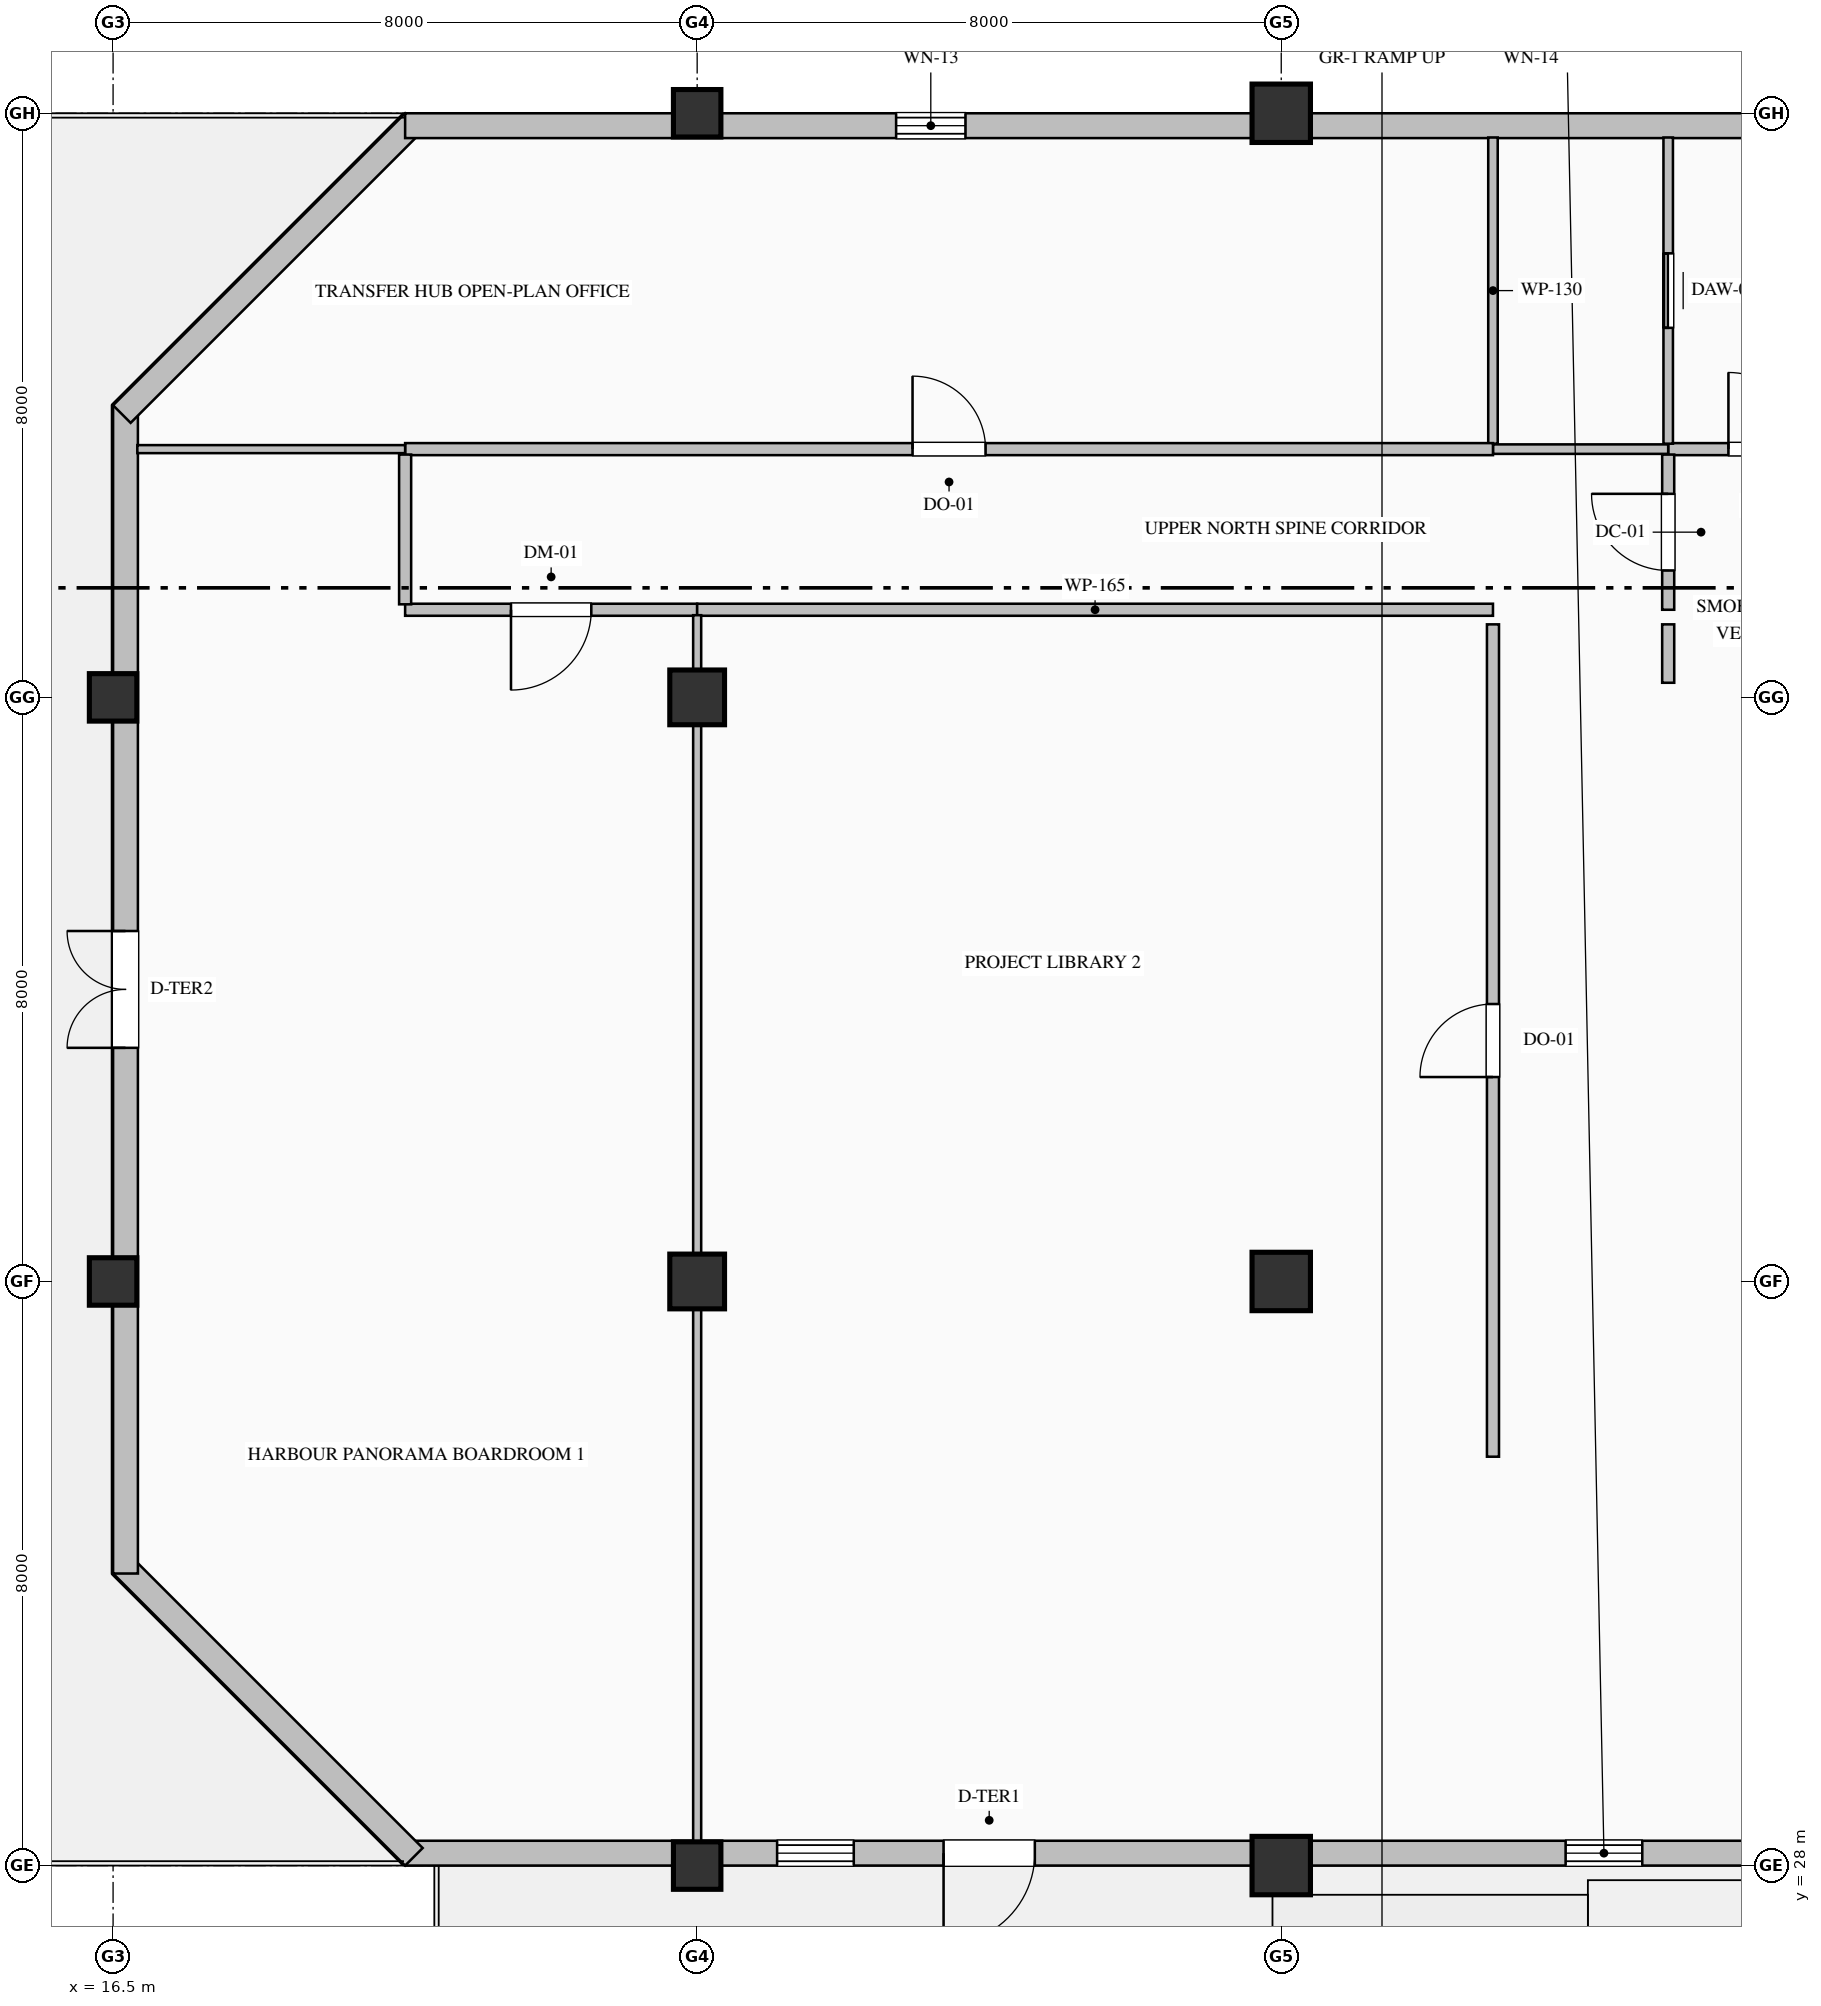
"""IFC4 building model, lengths in metres.
Left out: names, types, materials, properties, quantities, classifications, styles, units other than length and angle.
Written with IfcOpenShell. Run it as: python <this file> out.ifc"""

import sys

from ifc_helpers import new_model, si_unit, direction, frame, frame_2d, origin, origin_2d, place, context, subcontext, project, spatial, rectangle, hollow_rectangle, extrude, element, fill, save


model = new_model("IFC4")
c1 = context("Model", 3, precision=1e-05, world=origin(), true_north=direction((0.0, 1.0)))
c2 = subcontext(c1, "Body", "Model", "MODEL_VIEW")
j1 = project(units=[si_unit("LENGTHUNIT", "METRE"), si_unit("PLANEANGLEUNIT", "RADIAN")], contexts=[c1])
p1 = place(None, origin())
s1 = spatial("IfcSite", under=j1, at=p1, CompositionType="ELEMENT")
p2 = place(p1, origin())
s2 = spatial("IfcBuilding", under=s1, at=p2, CompositionType="ELEMENT")
p3 = place(p2, frame((0.0, 0.0, 287.2)))
s3 = spatial("IfcBuildingStorey", under=s2, at=p3, CompositionType="ELEMENT", Elevation=287.2)
for number, where, z_axis, x_axis in (
    (1, (16.5, 36.0, 0.0), (0.0, 0.0, 1.0), (1.0, 0.0, 0.0)),
    (2, (16.5, 44.0, 0.0), (0.0, 0.0, 1.0), (1.0, 0.0, 0.0)),
    (3, (24.5, 28.0, 0.0), (0.0, 0.0, 1.0), (1.0, 0.0, 0.0)),
):
    element("IfcColumn", number, at=place(p3, frame(where, z_axis=z_axis, x_axis=x_axis)), inside=s3, PredefinedType="COLUMN", context=c2, shape_type="SweptSolid", body=[
        extrude(hollow_rectangle(XDim=0.65, YDim=0.65, WallThickness=0.028, at=origin_2d()), origin(), (0.0, 0.0, 1.0), 4.0),
    ])
for number, where, z_axis, x_axis in (
    (4, (24.5, 36.0, 0.0), (0.0, 0.0, 1.0), (1.0, 0.0, 0.0)),
    (5, (24.5, 44.0, 0.0), (0.0, 0.0, 1.0), (1.0, 0.0, 0.0)),
):
    element("IfcColumn", number, at=place(p3, frame(where, z_axis=z_axis, x_axis=x_axis)), inside=s3, PredefinedType="COLUMN", context=c2, shape_type="SweptSolid", body=[
        extrude(rectangle(XDim=0.75, YDim=0.75, at=origin_2d()), origin(), (0.0, 0.0, 1.0), 4.0),
    ])
p4 = place(p3, frame((24.5, 52.0, 0.0), z_axis=(0.0, 0.0, 1.0), x_axis=(1.0, 0.0, 0.0)))
e6 = element("IfcColumn", 6, at=p4, inside=s3, PredefinedType="COLUMN", context=c2, shape_type="SweptSolid", body=[
    extrude(hollow_rectangle(XDim=0.65, YDim=0.65, WallThickness=0.028, at=origin_2d()), origin(), (0.0, 0.0, 1.0), 4.0),
])
for number, where, z_axis, x_axis in (
    (7, (32.5, 28.0, 0.0), (0.0, 0.0, 1.0), (1.0, 0.0, 0.0)),
    (8, (32.5, 36.0, 0.0), (0.0, 0.0, 1.0), (1.0, 0.0, 0.0)),
    (9, (32.5, 52.0, 0.0), (0.0, 0.0, 1.0), (1.0, 0.0, 0.0)),
):
    element("IfcColumn", number, at=place(p3, frame(where, z_axis=z_axis, x_axis=x_axis)), inside=s3, PredefinedType="COLUMN", context=c2, shape_type="SweptSolid", body=[
        extrude(hollow_rectangle(XDim=0.8, YDim=0.8, WallThickness=0.032, at=origin_2d()), origin(), (0.0, 0.0, 1.0), 4.0),
    ])
p5 = place(p3, frame((40.52, 28.17, 0.0), z_axis=(0.0, 0.0, 1.0), x_axis=(-1.0, 0.0, 0.0)))
e10 = element("IfcWall", 10, at=p5, inside=s3, PredefinedType="SOLIDWALL", context=c2, shape_type="SweptSolid", body=[
    extrude(rectangle(XDim=20.02, YDim=0.34, at=frame_2d((10.01, 0.0))), origin(), (0.0, 0.0, 1.0), 3.185),
])
p6 = place(p5, frame((3.075, 0.0, 0.8)))
e11 = element("IfcOpeningElement", 11, at=p6, cuts=e10, PredefinedType="OPENING", context=c2, shape_type="SweptSolid", body=[
    extrude(rectangle(XDim=1.05, YDim=2.15, at=frame_2d((0.525, 1.075))), frame((0.0, 0.18, 0.0), z_axis=(0.0, -1.0, 0.0), x_axis=(1.0, 0.0, 0.0)), (0.0, 0.0, 1.0), 0.36),
])
p7 = place(p5, frame((13.875, 0.0, 0.8)))
e12 = element("IfcOpeningElement", 12, at=p7, cuts=e10, PredefinedType="OPENING", context=c2, shape_type="SweptSolid", body=[
    extrude(rectangle(XDim=1.05, YDim=2.15, at=frame_2d((0.525, 1.075))), frame((0.0, 0.18, 0.0), z_axis=(0.0, -1.0, 0.0), x_axis=(1.0, 0.0, 0.0)), (0.0, 0.0, 1.0), 0.36),
])
p8 = place(p5, frame((11.395, 0.0, 0.0)))
e13 = element("IfcOpeningElement", 13, at=p8, cuts=e10, PredefinedType="OPENING", context=c2, shape_type="SweptSolid", body=[
    extrude(rectangle(XDim=1.25, YDim=2.25, at=frame_2d((0.625, 1.125))), frame((0.0, 0.18, 0.0), z_axis=(0.0, -1.0, 0.0), x_axis=(1.0, 0.0, 0.0)), (0.0, 0.0, 1.0), 0.36),
])
p9 = place(p3, frame((20.62, 28.12, 0.0), z_axis=(0.0, 0.0, 1.0), x_axis=(-0.707106781187, 0.707106781187, 0.0)))
e14 = element("IfcWall", 14, at=p9, inside=s3, PredefinedType="SOLIDWALL", context=c2, shape_type="SweptSolid", body=[
    extrude(rectangle(XDim=5.657, YDim=0.34, at=frame_2d((2.828, 0.0))), origin(), (0.0, 0.0, 1.0), 3.785),
])
p10 = place(p3, frame((16.67, 32.0, 0.0), z_axis=(0.0, 0.0, 1.0), x_axis=(0.0, 1.0, 0.0)))
e15 = element("IfcWall", 15, at=p10, inside=s3, PredefinedType="SOLIDWALL", context=c2, shape_type="SweptSolid", body=[
    extrude(rectangle(XDim=16.0, YDim=0.34, at=frame_2d((8.0, 0.0))), origin(), (0.0, 0.0, 1.0), 3.335),
])
p11 = place(p10, frame((7.2, 0.0, 0.0)))
e16 = element("IfcOpeningElement", 16, at=p11, cuts=e15, PredefinedType="OPENING", context=c2, shape_type="SweptSolid", body=[
    extrude(rectangle(XDim=1.6, YDim=2.35, at=frame_2d((0.8, 1.175))), frame((0.0, 0.18, 0.0), z_axis=(0.0, -1.0, 0.0), x_axis=(1.0, 0.0, 0.0)), (0.0, 0.0, 1.0), 0.36),
])
p12 = place(p3, frame((16.62, 47.88, 0.0), z_axis=(0.0, 0.0, 1.0), x_axis=(0.707106781187, 0.707106781187, 0.0)))
e17 = element("IfcWall", 17, at=p12, inside=s3, PredefinedType="SOLIDWALL", context=c2, shape_type="SweptSolid", body=[
    extrude(rectangle(XDim=5.657, YDim=0.34, at=frame_2d((2.828, 0.0))), origin(), (0.0, 0.0, 1.0), 3.785),
])
p13 = place(p3, frame((20.5, 51.83, 0.0), z_axis=(0.0, 0.0, 1.0), x_axis=(1.0, 0.0, 0.0)))
e18 = element("IfcWall", 18, at=p13, inside=s3, PredefinedType="SOLIDWALL", context=c2, shape_type="SweptSolid", body=[
    extrude(rectangle(XDim=20.02, YDim=0.34, at=frame_2d((10.01, 0.0))), origin(), (0.0, 0.0, 1.0), 3.335),
])
p14 = place(p13, frame((6.725, 0.0, 0.9)))
e19 = element("IfcOpeningElement", 19, at=p14, cuts=e18, PredefinedType="OPENING", context=c2, shape_type="SweptSolid", body=[
    extrude(rectangle(XDim=0.95, YDim=1.85, at=frame_2d((0.475, 0.925))), frame((0.0, 0.18, 0.0), z_axis=(0.0, -1.0, 0.0), x_axis=(1.0, 0.0, 0.0)), (0.0, 0.0, 1.0), 0.36),
])
p15 = place(p3, frame((37.8, 47.4, 0.0), z_axis=(0.0, 0.0, 1.0), x_axis=(1.0, 0.0, 0.0)))
e20 = element("IfcWall", 20, at=p15, inside=s3, PredefinedType="PARTITIONING", context=c2, shape_type="SweptSolid", body=[
    extrude(rectangle(XDim=2.7, YDim=0.165, at=frame_2d((1.35, 0.0))), origin(), (0.0, 0.0, 1.0), 3.785),
])
p16 = place(p15, frame((0.825, 0.0, 0.0)))
e21 = element("IfcOpeningElement", 21, at=p16, cuts=e20, PredefinedType="OPENING", context=c2, shape_type="SweptSolid", body=[
    extrude(rectangle(XDim=1.05, YDim=2.15, at=frame_2d((0.525, 1.075))), frame((0.0, 0.093, 0.0), z_axis=(0.0, -1.0, 0.0), x_axis=(1.0, 0.0, 0.0)), (0.0, 0.0, 1.0), 0.185),
])
p17 = place(p3, frame((37.8, 45.2, 0.0), z_axis=(0.0, 0.0, 1.0), x_axis=(0.0, 1.0, 0.0)))
e22 = element("IfcWall", 22, at=p17, inside=s3, PredefinedType="PARTITIONING", context=c2, shape_type="SweptSolid", body=[
    extrude(rectangle(XDim=2.125, YDim=0.165, at=frame_2d((1.063, 0.0))), origin(), (0.0, 0.0, 1.0), 3.785),
])
p18 = place(p17, frame((0.538, 0.0, 0.0)))
e23 = element("IfcOpeningElement", 23, at=p18, cuts=e22, PredefinedType="OPENING", context=c2, shape_type="SweptSolid", body=[
    extrude(rectangle(XDim=1.05, YDim=2.15, at=frame_2d((0.525, 1.075))), frame((0.0, 0.093, 0.0), z_axis=(0.0, -1.0, 0.0), x_axis=(1.0, 0.0, 0.0)), (0.0, 0.0, 1.0), 0.185),
])
p19 = place(p3, frame((37.8, 44.2, 0.0), z_axis=(0.0, 0.0, 1.0), x_axis=(0.0, 1.0, 0.0)))
e24 = element("IfcWall", 24, at=p19, inside=s3, PredefinedType="PARTITIONING", context=c2, shape_type="SweptSolid", body=[
    extrude(rectangle(XDim=0.8, YDim=0.165, at=frame_2d((0.4, 0.0))), origin(), (0.0, 0.0, 1.0), 3.785),
])
p20 = place(p3, frame((37.8, 47.475, 0.0), z_axis=(0.0, 0.0, 1.0), x_axis=(0.0, 1.0, 0.0)))
e25 = element("IfcWall", 25, at=p20, inside=s3, PredefinedType="PARTITIONING", context=c2, shape_type="SweptSolid", body=[
    extrude(rectangle(XDim=4.193, YDim=0.13, at=frame_2d((2.097, 0.0))), origin(), (0.0, 0.0, 1.0), 3.785),
])
p21 = place(p20, frame((1.587, 0.0, 0.0)))
e26 = element("IfcOpeningElement", 26, at=p21, cuts=e25, PredefinedType="OPENING", context=c2, shape_type="SweptSolid", body=[
    extrude(rectangle(XDim=1.02, YDim=2.15, at=frame_2d((0.51, 1.075))), frame((0.0, 0.075, 0.0), z_axis=(0.0, -1.0, 0.0), x_axis=(1.0, 0.0, 0.0)), (0.0, 0.0, 1.0), 0.15),
])
p22 = place(p3, frame((37.8, 47.4, 0.0), z_axis=(0.0, 0.0, 1.0), x_axis=(-1.0, 0.0, 0.0)))
e27 = element("IfcWall", 27, at=p22, inside=s3, PredefinedType="PARTITIONING", context=c2, shape_type="SweptSolid", body=[
    extrude(rectangle(XDim=2.4, YDim=0.13, at=frame_2d((1.2, 0.0))), origin(), (0.0, 0.0, 1.0), 3.785),
])
p23 = place(p3, frame((35.4, 47.475, 0.0), z_axis=(0.0, 0.0, 1.0), x_axis=(0.0, 1.0, 0.0)))
e28 = element("IfcWall", 28, at=p23, inside=s3, PredefinedType="PARTITIONING", context=c2, shape_type="SweptSolid", body=[
    extrude(rectangle(XDim=4.193, YDim=0.13, at=frame_2d((2.097, 0.0))), origin(), (0.0, 0.0, 1.0), 3.785),
])
p24 = place(p3, frame((20.5, 47.4, 0.0), z_axis=(0.0, 0.0, 1.0), x_axis=(1.0, 0.0, 0.0)))
e29 = element("IfcWall", 29, at=p24, inside=s3, PredefinedType="PARTITIONING", context=c2, shape_type="SweptSolid", body=[
    extrude(rectangle(XDim=14.9, YDim=0.165, at=frame_2d((7.45, 0.0))), origin(), (0.0, 0.0, 1.0), 3.785),
])
p25 = place(p24, frame((6.95, 0.0, 0.0)))
e30 = element("IfcOpeningElement", 30, at=p25, cuts=e29, PredefinedType="OPENING", context=c2, shape_type="SweptSolid", body=[
    extrude(rectangle(XDim=1.0, YDim=2.15, at=frame_2d((0.5, 1.075))), frame((0.0, 0.093, 0.0), z_axis=(0.0, -1.0, 0.0), x_axis=(1.0, 0.0, 0.0)), (0.0, 0.0, 1.0), 0.185),
])
p26 = place(p3, frame((24.5, 45.2, 0.0), z_axis=(0.0, 0.0, 1.0), x_axis=(-1.0, 0.0, 0.0)))
e31 = element("IfcWall", 31, at=p26, inside=s3, PredefinedType="PARTITIONING", context=c2, shape_type="SweptSolid", body=[
    extrude(rectangle(XDim=4.0, YDim=0.165, at=frame_2d((2.0, 0.0))), origin(), (0.0, 0.0, 1.0), 3.785),
])
p27 = place(p26, frame((1.45, 0.0, 0.0)))
e32 = element("IfcOpeningElement", 32, at=p27, cuts=e31, PredefinedType="OPENING", context=c2, shape_type="SweptSolid", body=[
    extrude(rectangle(XDim=1.1, YDim=2.2, at=frame_2d((0.55, 1.1))), frame((0.0, 0.093, 0.0), z_axis=(0.0, -1.0, 0.0), x_axis=(1.0, 0.0, 0.0)), (0.0, 0.0, 1.0), 0.185),
])
p28 = place(p3, frame((20.5, 45.274, 0.0), z_axis=(0.0, 0.0, 1.0), x_axis=(0.0, 1.0, 0.0)))
e33 = element("IfcWall", 33, at=p28, inside=s3, PredefinedType="PARTITIONING", context=c2, shape_type="SweptSolid", body=[
    extrude(rectangle(XDim=2.051, YDim=0.165, at=frame_2d((1.025, 0.0))), origin(), (0.0, 0.0, 1.0), 3.785),
])
p29 = place(p3, frame((35.4, 45.2, 0.0), z_axis=(0.0, 0.0, 1.0), x_axis=(-1.0, 0.0, 0.0)))
e34 = element("IfcWall", 34, at=p29, inside=s3, PredefinedType="PARTITIONING", context=c2, shape_type="SweptSolid", body=[
    extrude(rectangle(XDim=10.9, YDim=0.165, at=frame_2d((5.45, 0.0))), origin(), (0.0, 0.0, 1.0), 3.785),
])
p30 = place(p3, frame((35.4, 33.6, 0.0), z_axis=(0.0, 0.0, 1.0), x_axis=(0.0, 1.0, 0.0)))
e35 = element("IfcWall", 35, at=p30, inside=s3, PredefinedType="PARTITIONING", context=c2, shape_type="SweptSolid", body=[
    extrude(rectangle(XDim=11.4, YDim=0.165, at=frame_2d((5.7, 0.0))), origin(), (0.0, 0.0, 1.0), 3.785),
])
p31 = place(p30, frame((5.2, 0.0, 0.0)))
e36 = element("IfcOpeningElement", 36, at=p31, cuts=e35, PredefinedType="OPENING", context=c2, shape_type="SweptSolid", body=[
    extrude(rectangle(XDim=1.0, YDim=2.15, at=frame_2d((0.5, 1.075))), frame((0.0, 0.093, 0.0), z_axis=(0.0, -1.0, 0.0), x_axis=(1.0, 0.0, 0.0)), (0.0, 0.0, 1.0), 0.185),
])
p32 = place(p3, frame((20.5, 47.4, 0.0), z_axis=(0.0, 0.0, 1.0), x_axis=(-1.0, 0.0, 0.0)))
e37 = element("IfcWall", 37, at=p32, inside=s3, PredefinedType="MOVABLE", context=c2, shape_type="SweptSolid", body=[
    extrude(rectangle(XDim=3.668, YDim=0.11, at=frame_2d((1.834, 0.0))), origin(), (0.0, 0.0, 1.0), 3.785),
])
p33 = place(p3, frame((24.5, 45.125, 0.0), z_axis=(0.0, 0.0, 1.0), x_axis=(0.0, -1.0, 0.0)))
e38 = element("IfcWall", 38, at=p33, inside=s3, PredefinedType="MOVABLE", context=c2, shape_type="SweptSolid", body=[
    extrude(rectangle(XDim=16.793, YDim=0.11, at=frame_2d((8.397, 0.0))), origin(), (0.0, 0.0, 1.0), 3.177),
])
p34 = place(p6, origin())
e39 = element("IfcWindow", 39, at=p34, inside=s3, PartitioningType="SINGLE_PANEL", PredefinedType="WINDOW", context=c2, shape_type="SweptSolid", body=[
    extrude(rectangle(XDim=1.05, YDim=2.15, at=frame_2d((0.525, 1.075))), frame((0.0, 0.15, 0.0), z_axis=(0.0, -1.0, 0.0), x_axis=(1.0, 0.0, 0.0)), (0.0, 0.0, 1.0), 0.06),
])
fill(e11, e39)
p35 = place(p7, origin())
e40 = element("IfcWindow", 40, at=p35, inside=s3, PartitioningType="SINGLE_PANEL", PredefinedType="WINDOW", context=c2, shape_type="SweptSolid", body=[
    extrude(rectangle(XDim=1.05, YDim=2.15, at=frame_2d((0.525, 1.075))), frame((0.0, 0.15, 0.0), z_axis=(0.0, -1.0, 0.0), x_axis=(1.0, 0.0, 0.0)), (0.0, 0.0, 1.0), 0.06),
])
fill(e12, e40)
p36 = place(p14, origin())
e41 = element("IfcWindow", 41, at=p36, inside=s3, PartitioningType="SINGLE_PANEL", PredefinedType="WINDOW", context=c2, shape_type="SweptSolid", body=[
    extrude(rectangle(XDim=0.95, YDim=1.85, at=frame_2d((0.475, 0.925))), frame((0.0, 0.15, 0.0), z_axis=(0.0, -1.0, 0.0), x_axis=(1.0, 0.0, 0.0)), (0.0, 0.0, 1.0), 0.06),
])
fill(e19, e41)
p37 = place(p11, origin())
e42 = element("IfcDoor", 42, at=p37, inside=s3, OperationType="DOUBLE_DOOR_SINGLE_SWING", PredefinedType="DOOR", context=c2, shape_type="SweptSolid", body=[
    extrude(rectangle(XDim=1.6, YDim=2.35, at=frame_2d((0.8, 1.175))), frame((0.0, 0.025, 0.0), z_axis=(0.0, -1.0, 0.0), x_axis=(1.0, 0.0, 0.0)), (0.0, 0.0, 1.0), 0.05),
])
fill(e16, e42)
p38 = place(p8, origin())
e43 = element("IfcDoor", 43, at=p38, inside=s3, OperationType="SINGLE_SWING_RIGHT", PredefinedType="DOOR", context=c2, shape_type="SweptSolid", body=[
    extrude(rectangle(XDim=1.25, YDim=2.25, at=frame_2d((0.625, 1.125))), frame((0.0, 0.025, 0.0), z_axis=(0.0, -1.0, 0.0), x_axis=(1.0, 0.0, 0.0)), (0.0, 0.0, 1.0), 0.05),
])
fill(e13, e43)
p39 = place(p16, origin())
e44 = element("IfcDoor", 44, at=p39, inside=s3, OperationType="SINGLE_SWING_LEFT", PredefinedType="DOOR", context=c2, shape_type="SweptSolid", body=[
    extrude(rectangle(XDim=1.05, YDim=2.15, at=frame_2d((0.525, 1.075))), frame((0.0, 0.025, 0.0), z_axis=(0.0, -1.0, 0.0), x_axis=(1.0, 0.0, 0.0)), (0.0, 0.0, 1.0), 0.05),
])
fill(e21, e44)
p40 = place(p18, origin())
e45 = element("IfcDoor", 45, at=p40, inside=s3, OperationType="SINGLE_SWING_RIGHT", PredefinedType="DOOR", context=c2, shape_type="SweptSolid", body=[
    extrude(rectangle(XDim=1.05, YDim=2.15, at=frame_2d((0.525, 1.075))), frame((0.0, 0.025, 0.0), z_axis=(0.0, -1.0, 0.0), x_axis=(1.0, 0.0, 0.0)), (0.0, 0.0, 1.0), 0.05),
])
fill(e23, e45)
p41 = place(p21, origin())
e46 = element("IfcDoor", 46, at=p41, inside=s3, OperationType="SLIDING_TO_LEFT", PredefinedType="DOOR", context=c2, shape_type="SweptSolid", body=[
    extrude(rectangle(XDim=1.02, YDim=2.15, at=frame_2d((0.51, 1.075))), frame((0.0, 0.025, 0.0), z_axis=(0.0, -1.0, 0.0), x_axis=(1.0, 0.0, 0.0)), (0.0, 0.0, 1.0), 0.05),
])
fill(e26, e46)
p42 = place(p25, origin())
e47 = element("IfcDoor", 47, at=p42, inside=s3, OperationType="SINGLE_SWING_LEFT", PredefinedType="DOOR", context=c2, shape_type="SweptSolid", body=[
    extrude(rectangle(XDim=1.0, YDim=2.15, at=frame_2d((0.5, 1.075))), frame((0.0, 0.025, 0.0), z_axis=(0.0, -1.0, 0.0), x_axis=(1.0, 0.0, 0.0)), (0.0, 0.0, 1.0), 0.05),
])
fill(e30, e47)
p43 = place(p27, origin())
e48 = element("IfcDoor", 48, at=p43, inside=s3, OperationType="SINGLE_SWING_RIGHT", PredefinedType="DOOR", context=c2, shape_type="SweptSolid", body=[
    extrude(rectangle(XDim=1.1, YDim=2.2, at=frame_2d((0.55, 1.1))), frame((0.0, 0.025, 0.0), z_axis=(0.0, -1.0, 0.0), x_axis=(1.0, 0.0, 0.0)), (0.0, 0.0, 1.0), 0.05),
])
fill(e32, e48)
p44 = place(p31, origin())
e49 = element("IfcDoor", 49, at=p44, inside=s3, OperationType="SINGLE_SWING_LEFT", PredefinedType="DOOR", context=c2, shape_type="SweptSolid", body=[
    extrude(rectangle(XDim=1.0, YDim=2.15, at=frame_2d((0.5, 1.075))), frame((0.0, 0.025, 0.0), z_axis=(0.0, -1.0, 0.0), x_axis=(1.0, 0.0, 0.0)), (0.0, 0.0, 1.0), 0.05),
])
fill(e36, e49)
save(model, sys.argv[1])
